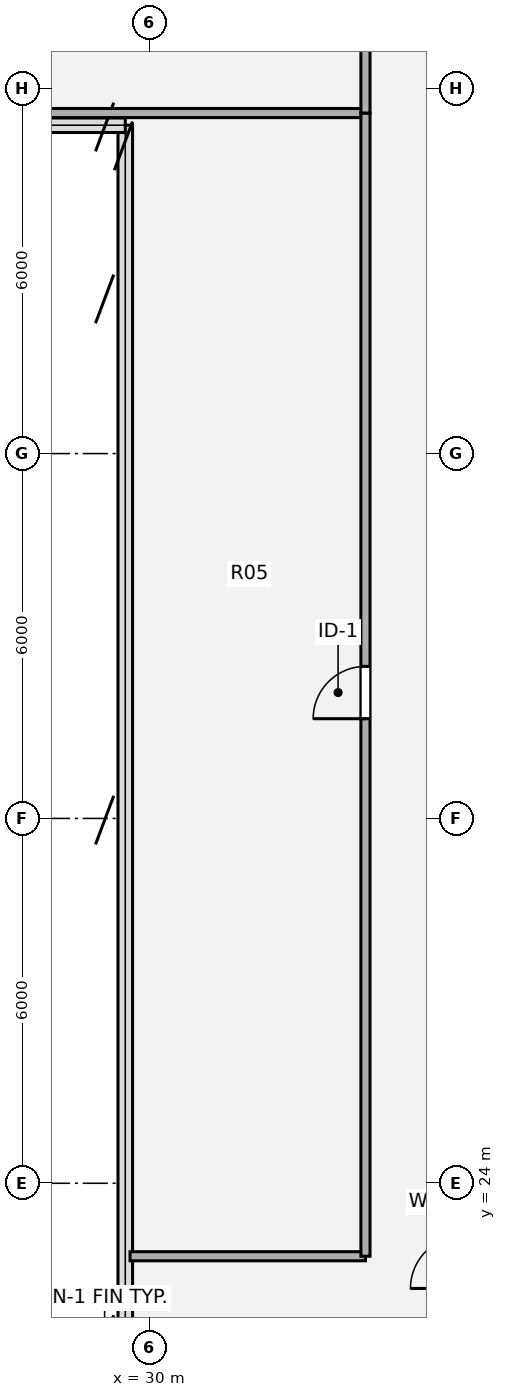
"""IFC4 building model, lengths in metres.
Left out: names, types, materials, properties, quantities, classifications, styles, units other than length and angle.
Written with IfcOpenShell. Run it as: python <this file> out.ifc"""

import sys

from ifc_helpers import new_model, si_unit, direction, frame, frame_2d, origin, origin_2d, place, context, subcontext, project, spatial, rectangle, extrude, source, transform, mapped, element, fill, save


model = new_model("IFC4")
c1 = context("Model", 3, precision=1e-05, world=origin(), true_north=direction((0.0, 1.0)))
c2 = subcontext(c1, "Body", "Model", "MODEL_VIEW")
j1 = project(units=[si_unit("LENGTHUNIT", "METRE"), si_unit("PLANEANGLEUNIT", "RADIAN")], contexts=[c1])
p1 = place(None, origin())
s1 = spatial("IfcSite", under=j1, at=p1, CompositionType="ELEMENT")
p2 = place(p1, origin())
s2 = spatial("IfcBuilding", under=s1, at=p2, CompositionType="ELEMENT")
p3 = place(p2, frame((0.0, 0.0, 257.04)))
s3 = spatial("IfcBuildingStorey", under=s2, at=p3, CompositionType="ELEMENT", Elevation=257.04)
p4 = place(p3, frame((29.678, 22.8, 0.0), z_axis=(0.0, 0.0, 1.0), x_axis=(1.0, 0.0, 0.0)))
e1 = element("IfcWall", 1, at=p4, inside=s3, PredefinedType="PARTITIONING", context=c2, shape_type="SweptSolid", body=[
    extrude(rectangle(XDim=3.872, YDim=0.15, at=frame_2d((1.936, 0.0))), origin(), (0.0, 0.0, 1.0), 3.5),
])
p5 = place(p3, frame((27.558, 41.6, 0.0), z_axis=(0.0, 0.0, 1.0), x_axis=(1.0, 0.0, 0.0)))
e2 = element("IfcWall", 2, at=p5, inside=s3, PredefinedType="PARTITIONING", context=c2, shape_type="SweptSolid", body=[
    extrude(rectangle(XDim=5.992, YDim=0.15, at=frame_2d((2.996, 0.0))), origin(), (0.0, 0.0, 1.0), 3.5),
])
p6 = place(p3, frame((33.55, 22.8, 0.0), z_axis=(0.0, 0.0, 1.0), x_axis=(0.0, 1.0, 0.0)))
e3 = element("IfcWall", 3, at=p6, inside=s3, PredefinedType="PARTITIONING", context=c2, shape_type="SweptSolid", body=[
    extrude(rectangle(XDim=18.8, YDim=0.15, at=frame_2d((9.4, 0.0))), origin(), (0.0, 0.0, 1.0), 3.5),
])
p7 = place(p6, frame((8.84, 0.0, 0.0)))
e4 = element("IfcOpeningElement", 4, at=p7, cuts=e3, PredefinedType="OPENING", context=c2, shape_type="SweptSolid", body=[
    extrude(rectangle(XDim=0.86, YDim=2.1, at=origin_2d()), frame((0.43, 0.085, 1.05), z_axis=(0.0, -1.0, 0.0), x_axis=(1.0, 0.0, 0.0)), (0.0, 0.0, 1.0), 0.17),
])
p8 = place(p3, frame((33.55, 41.6, 0.0), z_axis=(0.0, 0.0, 1.0), x_axis=(0.0, 1.0, 0.0)))
e5 = element("IfcWall", 5, at=p8, inside=s3, PredefinedType="PARTITIONING", context=c2, shape_type="SweptSolid", body=[
    extrude(rectangle(XDim=17.4, YDim=0.15, at=frame_2d((8.7, 0.0))), origin(), (0.0, 0.0, 1.0), 3.5),
])
p9 = place(p8, frame((8.175, 0.0, 0.0)))
e6 = element("IfcOpeningElement", 6, at=p9, cuts=e5, PredefinedType="OPENING", context=c2, shape_type="SweptSolid", body=[
    extrude(rectangle(XDim=1.05, YDim=2.1, at=origin_2d()), frame((0.525, 0.085, 1.05), z_axis=(0.0, -1.0, 0.0), x_axis=(1.0, 0.0, 0.0)), (0.0, 0.0, 1.0), 0.17),
])
m1 = source(origin(), c2, "Body", "SweptSolid", [
    extrude(rectangle(XDim=0.86, YDim=2.1, at=origin_2d()), frame((0.43, 0.025, 1.05), z_axis=(0.0, -1.0, 0.0), x_axis=(1.0, 0.0, 0.0)), (0.0, 0.0, 1.0), 0.05),
])
p10 = place(p7, origin())
e7 = element("IfcDoor", 7, at=p10, inside=s3, OperationType="SINGLE_SWING_LEFT", PredefinedType="DOOR", context=c2, shape_type="MappedRepresentation", body=[
    mapped(m1, transform((0.0, 0.0, 0.0), x_axis=(1.0, 0.0, 0.0), y_axis=(0.0, 1.0, 0.0), z_axis=(0.0, 0.0, 1.0), scale=1.0)),
])
fill(e4, e7)
save(model, sys.argv[1])
